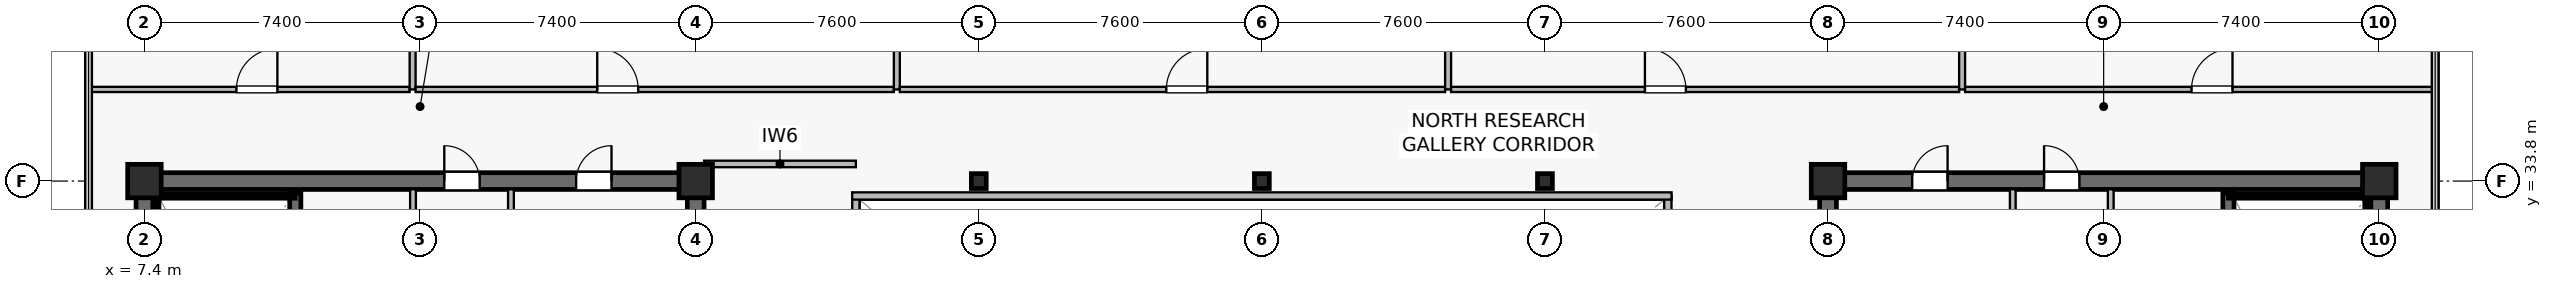
"""IFC4 building model, lengths in metres.
Left out: names, types, materials, properties, quantities, classifications, styles, units other than length and angle.
Written with IfcOpenShell. Run it as: python <this file> out.ifc"""

import sys

from ifc_helpers import new_model, si_unit, direction, frame, frame_2d, origin, origin_2d, place, context, subcontext, project, spatial, rectangle, i_section, extrude, source, transform, mapped, element, fill, save


model = new_model("IFC4")
c1 = context("Model", 3, precision=1e-05, world=origin(), true_north=direction((0.0, 1.0)))
c2 = subcontext(c1, "Body", "Model", "MODEL_VIEW")
j1 = project(units=[si_unit("LENGTHUNIT", "METRE"), si_unit("PLANEANGLEUNIT", "RADIAN")], contexts=[c1])
p1 = place(None, origin())
s1 = spatial("IfcSite", under=j1, at=p1, CompositionType="ELEMENT")
p2 = place(p1, origin())
s2 = spatial("IfcBuilding", under=s1, at=p2, CompositionType="ELEMENT")
p3 = place(p2, frame((0.0, 0.0, 301.8)))
s3 = spatial("IfcBuildingStorey", under=s2, at=p3, CompositionType="ELEMENT", Elevation=301.8)
p4 = place(p3, frame((7.175, 33.8, 0.0), z_axis=(0.0, 0.0, 1.0), x_axis=(1.0, 0.0, 0.0)))
e1 = element("IfcWall", 1, at=p4, inside=s3, PredefinedType="SHEAR", context=c2, shape_type="SweptSolid", body=[
    extrude(rectangle(XDim=15.25, YDim=0.45, at=frame_2d((7.625, 0.0))), origin(), (0.0, 0.0, 1.0), 3.9),
])
p5 = place(p4, frame((8.275, 0.0, 0.0)))
e2 = element("IfcOpeningElement", 2, at=p5, cuts=e1, PredefinedType="OPENING", context=c2, shape_type="SweptSolid", body=[
    extrude(rectangle(XDim=0.95, YDim=2.15, at=frame_2d((0.475, 1.075))), frame((0.0, 0.235, 0.0), z_axis=(0.0, -1.0, 0.0), x_axis=(1.0, 0.0, 0.0)), (0.0, 0.0, 1.0), 0.47),
])
p6 = place(p4, frame((11.815, 0.0, 0.0)))
e3 = element("IfcOpeningElement", 3, at=p6, cuts=e1, PredefinedType="OPENING", context=c2, shape_type="SweptSolid", body=[
    extrude(rectangle(XDim=0.95, YDim=2.15, at=frame_2d((0.475, 1.075))), frame((0.0, 0.235, 0.0), z_axis=(0.0, -1.0, 0.0), x_axis=(1.0, 0.0, 0.0)), (0.0, 0.0, 1.0), 0.47),
])
p7 = place(p3, frame((7.4, 15.025, 0.0), z_axis=(0.0, 0.0, 1.0), x_axis=(0.0, 1.0, 0.0)))
e4 = element("IfcWall", 4, at=p7, inside=s3, PredefinedType="SHEAR", context=c2, shape_type="SweptSolid", body=[
    extrude(rectangle(XDim=18.55, YDim=0.45, at=frame_2d((9.275, 0.0))), origin(), (0.0, 0.0, 1.0), 3.9),
])
p8 = place(p3, frame((22.2, 15.025, 0.0), z_axis=(0.0, 0.0, 1.0), x_axis=(0.0, 1.0, 0.0)))
e5 = element("IfcWall", 5, at=p8, inside=s3, PredefinedType="SHEAR", context=c2, shape_type="SweptSolid", body=[
    extrude(rectangle(XDim=18.55, YDim=0.45, at=frame_2d((9.275, 0.0))), origin(), (0.0, 0.0, 1.0), 3.9),
])
p9 = place(p8, frame((3.525, 0.0, 0.0)))
e6 = element("IfcOpeningElement", 6, at=p9, cuts=e5, PredefinedType="OPENING", context=c2, shape_type="SweptSolid", body=[
    extrude(rectangle(XDim=1.42, YDim=2.2, at=frame_2d((0.71, 1.1))), frame((0.0, 0.235, 0.0), z_axis=(0.0, -1.0, 0.0), x_axis=(1.0, 0.0, 0.0)), (0.0, 0.0, 1.0), 0.47),
])
p10 = place(p3, frame((11.45, 24.85, 0.0), z_axis=(0.0, 0.0, 1.0), x_axis=(0.0, 1.0, 0.0)))
e7 = element("IfcWall", 7, at=p10, inside=s3, PredefinedType="SHEAR", context=c2, shape_type="SweptSolid", body=[
    extrude(rectangle(XDim=8.63, YDim=0.3, at=frame_2d((4.315, 0.0))), origin(), (0.0, 0.0, 1.0), 3.9),
])
p11 = place(p10, frame((0.42, 0.0, 0.0)))
e8 = element("IfcOpeningElement", 8, at=p11, cuts=e7, PredefinedType="OPENING", context=c2, shape_type="SweptSolid", body=[
    extrude(rectangle(XDim=1.1, YDim=2.15, at=frame_2d((0.55, 1.075))), frame((0.0, 0.16, 0.0), z_axis=(0.0, -1.0, 0.0), x_axis=(1.0, 0.0, 0.0)), (0.0, 0.0, 1.0), 0.32),
])
p12 = place(p3, frame((7.73, 33.4, 0.0), z_axis=(0.0, 0.0, 1.0), x_axis=(1.0, 0.0, 0.0)))
e9 = element("IfcWall", 9, at=p12, inside=s3, PredefinedType="SOLIDWALL", context=c2, shape_type="SweptSolid", body=[
    extrude(rectangle(XDim=3.72, YDim=0.12, at=frame_2d((1.86, 0.0))), origin(), (0.0, 0.0, 1.0), 3.9),
])
p13 = place(p3, frame((7.73, 25.0, 0.0), z_axis=(0.0, 0.0, 1.0), x_axis=(0.0, 1.0, 0.0)))
e10 = element("IfcWall", 10, at=p13, inside=s3, PredefinedType="SOLIDWALL", context=c2, shape_type="SweptSolid", body=[
    extrude(rectangle(XDim=8.32, YDim=0.12, at=frame_2d((4.16, 0.0))), origin(), (0.0, 0.0, 1.0), 3.9),
])
p14 = place(p3, frame((52.375, 33.8, 0.0), z_axis=(0.0, 0.0, 1.0), x_axis=(1.0, 0.0, 0.0)))
e11 = element("IfcWall", 11, at=p14, inside=s3, PredefinedType="SHEAR", context=c2, shape_type="SweptSolid", body=[
    extrude(rectangle(XDim=15.25, YDim=0.45, at=frame_2d((7.625, 0.0))), origin(), (0.0, 0.0, 1.0), 3.9),
])
p15 = place(p14, frame((6.025, 0.0, 0.0)))
e12 = element("IfcOpeningElement", 12, at=p15, cuts=e11, PredefinedType="OPENING", context=c2, shape_type="SweptSolid", body=[
    extrude(rectangle(XDim=0.95, YDim=2.15, at=frame_2d((0.475, 1.075))), frame((0.0, 0.235, 0.0), z_axis=(0.0, -1.0, 0.0), x_axis=(1.0, 0.0, 0.0)), (0.0, 0.0, 1.0), 0.47),
])
p16 = place(p14, frame((2.485, 0.0, 0.0)))
e13 = element("IfcOpeningElement", 13, at=p16, cuts=e11, PredefinedType="OPENING", context=c2, shape_type="SweptSolid", body=[
    extrude(rectangle(XDim=0.95, YDim=2.15, at=frame_2d((0.475, 1.075))), frame((0.0, 0.235, 0.0), z_axis=(0.0, -1.0, 0.0), x_axis=(1.0, 0.0, 0.0)), (0.0, 0.0, 1.0), 0.47),
])
p17 = place(p3, frame((52.6, 15.025, 0.0), z_axis=(0.0, 0.0, 1.0), x_axis=(0.0, 1.0, 0.0)))
e14 = element("IfcWall", 14, at=p17, inside=s3, PredefinedType="SHEAR", context=c2, shape_type="SweptSolid", body=[
    extrude(rectangle(XDim=18.55, YDim=0.45, at=frame_2d((9.275, 0.0))), origin(), (0.0, 0.0, 1.0), 3.9),
])
p18 = place(p17, frame((3.525, 0.0, 0.0)))
e15 = element("IfcOpeningElement", 15, at=p18, cuts=e14, PredefinedType="OPENING", context=c2, shape_type="SweptSolid", body=[
    extrude(rectangle(XDim=1.42, YDim=2.2, at=frame_2d((0.71, 1.1))), frame((0.0, 0.235, 0.0), z_axis=(0.0, -1.0, 0.0), x_axis=(1.0, 0.0, 0.0)), (0.0, 0.0, 1.0), 0.47),
])
p19 = place(p3, frame((67.4, 15.025, 0.0), z_axis=(0.0, 0.0, 1.0), x_axis=(0.0, 1.0, 0.0)))
e16 = element("IfcWall", 16, at=p19, inside=s3, PredefinedType="SHEAR", context=c2, shape_type="SweptSolid", body=[
    extrude(rectangle(XDim=18.55, YDim=0.45, at=frame_2d((9.275, 0.0))), origin(), (0.0, 0.0, 1.0), 3.9),
])
p20 = place(p3, frame((63.35, 24.85, 0.0), z_axis=(0.0, 0.0, 1.0), x_axis=(0.0, 1.0, 0.0)))
e17 = element("IfcWall", 17, at=p20, inside=s3, PredefinedType="SHEAR", context=c2, shape_type="SweptSolid", body=[
    extrude(rectangle(XDim=8.63, YDim=0.3, at=frame_2d((4.315, 0.0))), origin(), (0.0, 0.0, 1.0), 3.9),
])
p21 = place(p20, frame((0.42, 0.0, 0.0)))
e18 = element("IfcOpeningElement", 18, at=p21, cuts=e17, PredefinedType="OPENING", context=c2, shape_type="SweptSolid", body=[
    extrude(rectangle(XDim=1.1, YDim=2.15, at=frame_2d((0.55, 1.075))), frame((0.0, 0.16, 0.0), z_axis=(0.0, -1.0, 0.0), x_axis=(1.0, 0.0, 0.0)), (0.0, 0.0, 1.0), 0.32),
])
p22 = place(p3, frame((63.35, 33.4, 0.0), z_axis=(0.0, 0.0, 1.0), x_axis=(1.0, 0.0, 0.0)))
e19 = element("IfcWall", 19, at=p22, inside=s3, PredefinedType="SOLIDWALL", context=c2, shape_type="SweptSolid", body=[
    extrude(rectangle(XDim=3.72, YDim=0.12, at=frame_2d((1.86, 0.0))), origin(), (0.0, 0.0, 1.0), 3.9),
])
p23 = place(p3, frame((67.07, 25.0, 0.0), z_axis=(0.0, 0.0, 1.0), x_axis=(0.0, 1.0, 0.0)))
e20 = element("IfcWall", 20, at=p23, inside=s3, PredefinedType="SOLIDWALL", context=c2, shape_type="SweptSolid", body=[
    extrude(rectangle(XDim=8.32, YDim=0.12, at=frame_2d((4.16, 0.0))), origin(), (0.0, 0.0, 1.0), 3.9),
])
m1 = source(origin(), c2, "Body", "SweptSolid", [
    extrude(rectangle(XDim=0.9, YDim=0.9, at=origin_2d()), origin(), (0.0, 0.0, 1.0), 4.2),
])
for number, where, z_axis, x_axis in (
    (21, (7.4, 33.8, 0.0), (0.0, 0.0, 1.0), (1.0, 0.0, 0.0)),
    (22, (22.2, 33.8, 0.0), (0.0, 0.0, 1.0), (1.0, 0.0, 0.0)),
    (23, (52.6, 33.8, 0.0), (0.0, 0.0, 1.0), (1.0, 0.0, 0.0)),
    (24, (67.4, 33.8, 0.0), (0.0, 0.0, 1.0), (1.0, 0.0, 0.0)),
):
    element("IfcColumn", number, at=place(p3, frame(where, z_axis=z_axis, x_axis=x_axis)), inside=s3, PredefinedType="COLUMN", context=c2, shape_type="MappedRepresentation", body=[
        mapped(m1, transform((0.0, 0.0, 0.0), scale=1.0)),
    ])
m2 = source(origin(), c2, "Body", "SweptSolid", [
    extrude(i_section(OverallWidth=0.4, OverallDepth=0.4, WebThickness=0.021, FlangeThickness=0.021, at=origin_2d()), origin(), (0.0, 0.0, 1.0), 4.2),
])
for number, where, z_axis, x_axis in (
    (25, (29.8, 33.8, 0.0), (0.0, 0.0, 1.0), (1.0, 0.0, 0.0)),
    (26, (37.4, 33.8, 0.0), (0.0, 0.0, 1.0), (1.0, 0.0, 0.0)),
    (27, (45.0, 33.8, 0.0), (0.0, 0.0, 1.0), (1.0, 0.0, 0.0)),
):
    element("IfcColumn", number, at=place(p3, frame(where, z_axis=z_axis, x_axis=x_axis)), inside=s3, PredefinedType="COLUMN", context=c2, shape_type="MappedRepresentation", body=[
        mapped(m2, transform((0.0, 0.0, 0.0), scale=1.0)),
    ])
p24 = place(p3, frame((14.61, 29.65, 0.0), z_axis=(0.0, 0.0, 1.0), x_axis=(0.0, 1.0, 0.0)))
e28 = element("IfcWall", 28, at=p24, inside=s3, PredefinedType="PLUMBINGWALL", context=c2, shape_type="SweptSolid", body=[
    extrude(rectangle(XDim=3.93, YDim=0.155, at=frame_2d((1.965, 0.0))), origin(), (0.0, 0.0, 1.0), 3.297),
])
p25 = place(p3, frame((17.24, 29.65, 0.0), z_axis=(0.0, 0.0, 1.0), x_axis=(0.0, 1.0, 0.0)))
e29 = element("IfcWall", 29, at=p25, inside=s3, PredefinedType="PLUMBINGWALL", context=c2, shape_type="SweptSolid", body=[
    extrude(rectangle(XDim=3.93, YDim=0.155, at=frame_2d((1.965, 0.0))), origin(), (0.0, 0.0, 1.0), 3.9),
])
p26 = place(p3, frame((60.19, 29.65, 0.0), z_axis=(0.0, 0.0, 1.0), x_axis=(0.0, 1.0, 0.0)))
e30 = element("IfcWall", 30, at=p26, inside=s3, PredefinedType="PLUMBINGWALL", context=c2, shape_type="SweptSolid", body=[
    extrude(rectangle(XDim=3.93, YDim=0.155, at=frame_2d((1.965, 0.0))), origin(), (0.0, 0.0, 1.0), 3.297),
])
p27 = place(p3, frame((57.56, 29.65, 0.0), z_axis=(0.0, 0.0, 1.0), x_axis=(0.0, 1.0, 0.0)))
e31 = element("IfcWall", 31, at=p27, inside=s3, PredefinedType="PLUMBINGWALL", context=c2, shape_type="SweptSolid", body=[
    extrude(rectangle(XDim=3.93, YDim=0.155, at=frame_2d((1.965, 0.0))), origin(), (0.0, 0.0, 1.0), 3.9),
])
p28 = place(p3, frame((22.425, 34.26, 0.0), z_axis=(0.0, 0.0, 1.0), x_axis=(1.0, 0.0, 0.0)))
e32 = element("IfcWall", 32, at=p28, inside=s3, PredefinedType="PARTITIONING", context=c2, shape_type="SweptSolid", body=[
    extrude(rectangle(XDim=4.075, YDim=0.175, at=frame_2d((2.038, 0.0))), origin(), (0.0, 0.0, 1.0), 3.635),
])
p29 = place(p3, frame((26.5, 15.2, 0.0), z_axis=(0.0, 0.0, 1.0), x_axis=(0.0, 1.0, 0.0)))
e33 = element("IfcWall", 33, at=p29, inside=s3, PredefinedType="SOLIDWALL", context=c2, shape_type="SweptSolid", body=[
    extrude(rectangle(XDim=18.2, YDim=0.195, at=frame_2d((9.1, 0.0))), origin(), (0.0, 0.0, 1.0), 3.9),
])
p30 = place(p29, frame((1.8, 0.0, 0.9)))
e34 = element("IfcOpeningElement", 34, at=p30, cuts=e33, PredefinedType="OPENING", context=c2, shape_type="SweptSolid", body=[
    extrude(rectangle(XDim=1.5, YDim=1.4, at=frame_2d((0.75, 0.7))), frame((0.0, 0.107, 0.0), z_axis=(0.0, -1.0, 0.0), x_axis=(1.0, 0.0, 0.0)), (0.0, 0.0, 1.0), 0.215),
])
p31 = place(p29, frame((13.2, 0.0, 0.9)))
e35 = element("IfcOpeningElement", 35, at=p31, cuts=e33, PredefinedType="OPENING", context=c2, shape_type="SweptSolid", body=[
    extrude(rectangle(XDim=1.5, YDim=1.4, at=frame_2d((0.75, 0.7))), frame((0.0, 0.107, 0.0), z_axis=(0.0, -1.0, 0.0), x_axis=(1.0, 0.0, 0.0)), (0.0, 0.0, 1.0), 0.215),
])
p32 = place(p3, frame((48.3, 15.2, 0.0), z_axis=(0.0, 0.0, 1.0), x_axis=(0.0, 1.0, 0.0)))
e36 = element("IfcWall", 36, at=p32, inside=s3, PredefinedType="SOLIDWALL", context=c2, shape_type="SweptSolid", body=[
    extrude(rectangle(XDim=18.2, YDim=0.195, at=frame_2d((9.1, 0.0))), origin(), (0.0, 0.0, 1.0), 3.9),
])
p33 = place(p32, frame((1.8, 0.0, 0.9)))
e37 = element("IfcOpeningElement", 37, at=p33, cuts=e36, PredefinedType="OPENING", context=c2, shape_type="SweptSolid", body=[
    extrude(rectangle(XDim=1.5, YDim=1.4, at=frame_2d((0.75, 0.7))), frame((0.0, 0.107, 0.0), z_axis=(0.0, -1.0, 0.0), x_axis=(1.0, 0.0, 0.0)), (0.0, 0.0, 1.0), 0.215),
])
p34 = place(p32, frame((13.2, 0.0, 0.9)))
e38 = element("IfcOpeningElement", 38, at=p34, cuts=e36, PredefinedType="OPENING", context=c2, shape_type="SweptSolid", body=[
    extrude(rectangle(XDim=1.5, YDim=1.4, at=frame_2d((0.75, 0.7))), frame((0.0, 0.107, 0.0), z_axis=(0.0, -1.0, 0.0), x_axis=(1.0, 0.0, 0.0)), (0.0, 0.0, 1.0), 0.215),
])
p35 = place(p3, frame((26.4, 33.4, 0.0), z_axis=(0.0, 0.0, 1.0), x_axis=(1.0, 0.0, 0.0)))
e39 = element("IfcWall", 39, at=p35, inside=s3, PredefinedType="SOLIDWALL", context=c2, shape_type="SweptSolid", body=[
    extrude(rectangle(XDim=22.0, YDim=0.195, at=frame_2d((11.0, 0.0))), origin(), (0.0, 0.0, 1.0), 3.9),
])
p36 = place(p3, frame((5.91, 36.26, 0.0), z_axis=(0.0, 0.0, 1.0), x_axis=(1.0, 0.0, 0.0)))
e40 = element("IfcWall", 40, at=p36, inside=s3, PredefinedType="PARTITIONING", context=c2, shape_type="SweptSolid", body=[
    extrude(rectangle(XDim=8.61, YDim=0.14, at=frame_2d((4.305, 0.0))), origin(), (0.0, 0.0, 1.0), 3.9),
])
p37 = place(p36, frame((3.959, 0.0, 0.0)))
e41 = element("IfcOpeningElement", 41, at=p37, cuts=e40, PredefinedType="OPENING", context=c2, shape_type="SweptSolid", body=[
    extrude(rectangle(XDim=1.1, YDim=2.18, at=frame_2d((0.55, 1.09))), frame((0.0, 0.08, 0.0), z_axis=(0.0, -1.0, 0.0), x_axis=(1.0, 0.0, 0.0)), (0.0, 0.0, 1.0), 0.16),
])
p38 = place(p3, frame((14.6, 36.26, 0.0), z_axis=(0.0, 0.0, 1.0), x_axis=(0.0, 1.0, 0.0)))
e42 = element("IfcWall", 42, at=p38, inside=s3, PredefinedType="PARTITIONING", context=c2, shape_type="SweptSolid", body=[
    extrude(rectangle(XDim=8.53, YDim=0.16, at=frame_2d((4.265, 0.0))), origin(), (0.0, 0.0, 1.0), 3.297),
])
p39 = place(p3, frame((14.68, 36.26, 0.0), z_axis=(0.0, 0.0, 1.0), x_axis=(1.0, 0.0, 0.0)))
e43 = element("IfcWall", 43, at=p39, inside=s3, PredefinedType="PARTITIONING", context=c2, shape_type="SweptSolid", body=[
    extrude(rectangle(XDim=12.84, YDim=0.14, at=frame_2d((6.42, 0.0))), origin(), (0.0, 0.0, 1.0), 3.297),
])
p40 = place(p39, frame((4.876, 0.0, 0.0)))
e44 = element("IfcOpeningElement", 44, at=p40, cuts=e43, PredefinedType="OPENING", context=c2, shape_type="SweptSolid", body=[
    extrude(rectangle(XDim=1.1, YDim=2.18, at=frame_2d((0.55, 1.09))), frame((0.0, 0.08, 0.0), z_axis=(0.0, -1.0, 0.0), x_axis=(1.0, 0.0, 0.0)), (0.0, 0.0, 1.0), 0.16),
])
p41 = place(p3, frame((27.6, 36.26, 0.0), z_axis=(0.0, 0.0, 1.0), x_axis=(0.0, 1.0, 0.0)))
e45 = element("IfcWall", 45, at=p41, inside=s3, PredefinedType="PARTITIONING", context=c2, shape_type="SweptSolid", body=[
    extrude(rectangle(XDim=7.53, YDim=0.16, at=frame_2d((3.765, 0.0))), origin(), (0.0, 0.0, 1.0), 2.985),
])
p42 = place(p3, frame((27.68, 36.26, 0.0), z_axis=(0.0, 0.0, 1.0), x_axis=(1.0, 0.0, 0.0)))
e46 = element("IfcWall", 46, at=p42, inside=s3, PredefinedType="PARTITIONING", context=c2, shape_type="SweptSolid", body=[
    extrude(rectangle(XDim=14.64, YDim=0.14, at=frame_2d((7.32, 0.0))), origin(), (0.0, 0.0, 1.0), 3.297),
])
p43 = place(p42, frame((7.155, 0.0, 0.0)))
e47 = element("IfcOpeningElement", 47, at=p43, cuts=e46, PredefinedType="OPENING", context=c2, shape_type="SweptSolid", body=[
    extrude(rectangle(XDim=1.1, YDim=2.18, at=frame_2d((0.55, 1.09))), frame((0.0, 0.08, 0.0), z_axis=(0.0, -1.0, 0.0), x_axis=(1.0, 0.0, 0.0)), (0.0, 0.0, 1.0), 0.16),
])
p44 = place(p3, frame((42.4, 36.26, 0.0), z_axis=(0.0, 0.0, 1.0), x_axis=(0.0, 1.0, 0.0)))
e48 = element("IfcWall", 48, at=p44, inside=s3, PredefinedType="PARTITIONING", context=c2, shape_type="SweptSolid", body=[
    extrude(rectangle(XDim=7.53, YDim=0.16, at=frame_2d((3.765, 0.0))), origin(), (0.0, 0.0, 1.0), 2.985),
])
p45 = place(p3, frame((42.48, 36.26, 0.0), z_axis=(0.0, 0.0, 1.0), x_axis=(1.0, 0.0, 0.0)))
e49 = element("IfcWall", 49, at=p45, inside=s3, PredefinedType="PARTITIONING", context=c2, shape_type="SweptSolid", body=[
    extrude(rectangle(XDim=13.64, YDim=0.14, at=frame_2d((6.82, 0.0))), origin(), (0.0, 0.0, 1.0), 3.297),
])
p46 = place(p45, frame((5.204, 0.0, 0.0)))
e50 = element("IfcOpeningElement", 50, at=p46, cuts=e49, PredefinedType="OPENING", context=c2, shape_type="SweptSolid", body=[
    extrude(rectangle(XDim=1.1, YDim=2.18, at=frame_2d((0.55, 1.09))), frame((0.0, 0.08, 0.0), z_axis=(0.0, -1.0, 0.0), x_axis=(1.0, 0.0, 0.0)), (0.0, 0.0, 1.0), 0.16),
])
p47 = place(p3, frame((56.2, 36.26, 0.0), z_axis=(0.0, 0.0, 1.0), x_axis=(0.0, 1.0, 0.0)))
e51 = element("IfcWall", 51, at=p47, inside=s3, PredefinedType="PARTITIONING", context=c2, shape_type="SweptSolid", body=[
    extrude(rectangle(XDim=8.53, YDim=0.16, at=frame_2d((4.265, 0.0))), origin(), (0.0, 0.0, 1.0), 3.235),
])
p48 = place(p3, frame((56.28, 36.26, 0.0), z_axis=(0.0, 0.0, 1.0), x_axis=(1.0, 0.0, 0.0)))
e52 = element("IfcWall", 52, at=p48, inside=s3, PredefinedType="PARTITIONING", context=c2, shape_type="SweptSolid", body=[
    extrude(rectangle(XDim=12.61, YDim=0.14, at=frame_2d((6.305, 0.0))), origin(), (0.0, 0.0, 1.0), 3.297),
])
p49 = place(p48, frame((6.079, 0.0, 0.0)))
e53 = element("IfcOpeningElement", 53, at=p49, cuts=e52, PredefinedType="OPENING", context=c2, shape_type="SweptSolid", body=[
    extrude(rectangle(XDim=1.1, YDim=2.18, at=frame_2d((0.55, 1.09))), frame((0.0, 0.08, 0.0), z_axis=(0.0, -1.0, 0.0), x_axis=(1.0, 0.0, 0.0)), (0.0, 0.0, 1.0), 0.16),
])
m3 = source(origin(), c2, "Body", "SweptSolid", [
    extrude(rectangle(XDim=0.95, YDim=2.15, at=frame_2d((0.475, 1.075))), frame((0.0, 0.025, 0.0), z_axis=(0.0, -1.0, 0.0), x_axis=(1.0, 0.0, 0.0)), (0.0, 0.0, 1.0), 0.05),
])
p50 = place(p5, origin())
e54 = element("IfcDoor", 54, at=p50, inside=s3, OperationType="SINGLE_SWING_LEFT", PredefinedType="DOOR", context=c2, shape_type="MappedRepresentation", body=[
    mapped(m3, transform((0.0, 0.0, 0.0), scale=1.0)),
])
fill(e2, e54)
p51 = place(p6, origin())
e55 = element("IfcDoor", 55, at=p51, inside=s3, OperationType="SINGLE_SWING_RIGHT", PredefinedType="DOOR", context=c2, shape_type="MappedRepresentation", body=[
    mapped(m3, transform((0.0, 0.0, 0.0), scale=1.0)),
])
fill(e3, e55)
p52 = place(p15, origin())
e56 = element("IfcDoor", 56, at=p52, inside=s3, OperationType="SINGLE_SWING_LEFT", PredefinedType="DOOR", context=c2, shape_type="MappedRepresentation", body=[
    mapped(m3, transform((0.0, 0.0, 0.0), scale=1.0)),
])
fill(e12, e56)
p53 = place(p16, origin())
e57 = element("IfcDoor", 57, at=p53, inside=s3, OperationType="SINGLE_SWING_RIGHT", PredefinedType="DOOR", context=c2, shape_type="MappedRepresentation", body=[
    mapped(m3, transform((0.0, 0.0, 0.0), scale=1.0)),
])
fill(e13, e57)
m4 = source(origin(), c2, "Body", "SweptSolid", [
    extrude(rectangle(XDim=1.1, YDim=2.18, at=frame_2d((0.55, 1.09))), frame((0.0, 0.025, 0.0), z_axis=(0.0, -1.0, 0.0), x_axis=(1.0, 0.0, 0.0)), (0.0, 0.0, 1.0), 0.05),
])
p54 = place(p37, origin())
e58 = element("IfcDoor", 58, at=p54, inside=s3, OperationType="SINGLE_SWING_RIGHT", PredefinedType="DOOR", context=c2, shape_type="MappedRepresentation", body=[
    mapped(m4, transform((0.0, 0.0, 0.0), scale=1.0)),
])
fill(e41, e58)
p55 = place(p40, origin())
e59 = element("IfcDoor", 59, at=p55, inside=s3, OperationType="SINGLE_SWING_LEFT", PredefinedType="DOOR", context=c2, shape_type="MappedRepresentation", body=[
    mapped(m4, transform((0.0, 0.0, 0.0), scale=1.0)),
])
fill(e44, e59)
p56 = place(p43, origin())
e60 = element("IfcDoor", 60, at=p56, inside=s3, OperationType="SINGLE_SWING_RIGHT", PredefinedType="DOOR", context=c2, shape_type="MappedRepresentation", body=[
    mapped(m4, transform((0.0, 0.0, 0.0), scale=1.0)),
])
fill(e47, e60)
p57 = place(p46, origin())
e61 = element("IfcDoor", 61, at=p57, inside=s3, OperationType="SINGLE_SWING_LEFT", PredefinedType="DOOR", context=c2, shape_type="MappedRepresentation", body=[
    mapped(m4, transform((0.0, 0.0, 0.0), scale=1.0)),
])
fill(e50, e61)
p58 = place(p49, origin())
e62 = element("IfcDoor", 62, at=p58, inside=s3, OperationType="SINGLE_SWING_RIGHT", PredefinedType="DOOR", context=c2, shape_type="MappedRepresentation", body=[
    mapped(m4, transform((0.0, 0.0, 0.0), scale=1.0)),
])
fill(e53, e62)
save(model, sys.argv[1])
